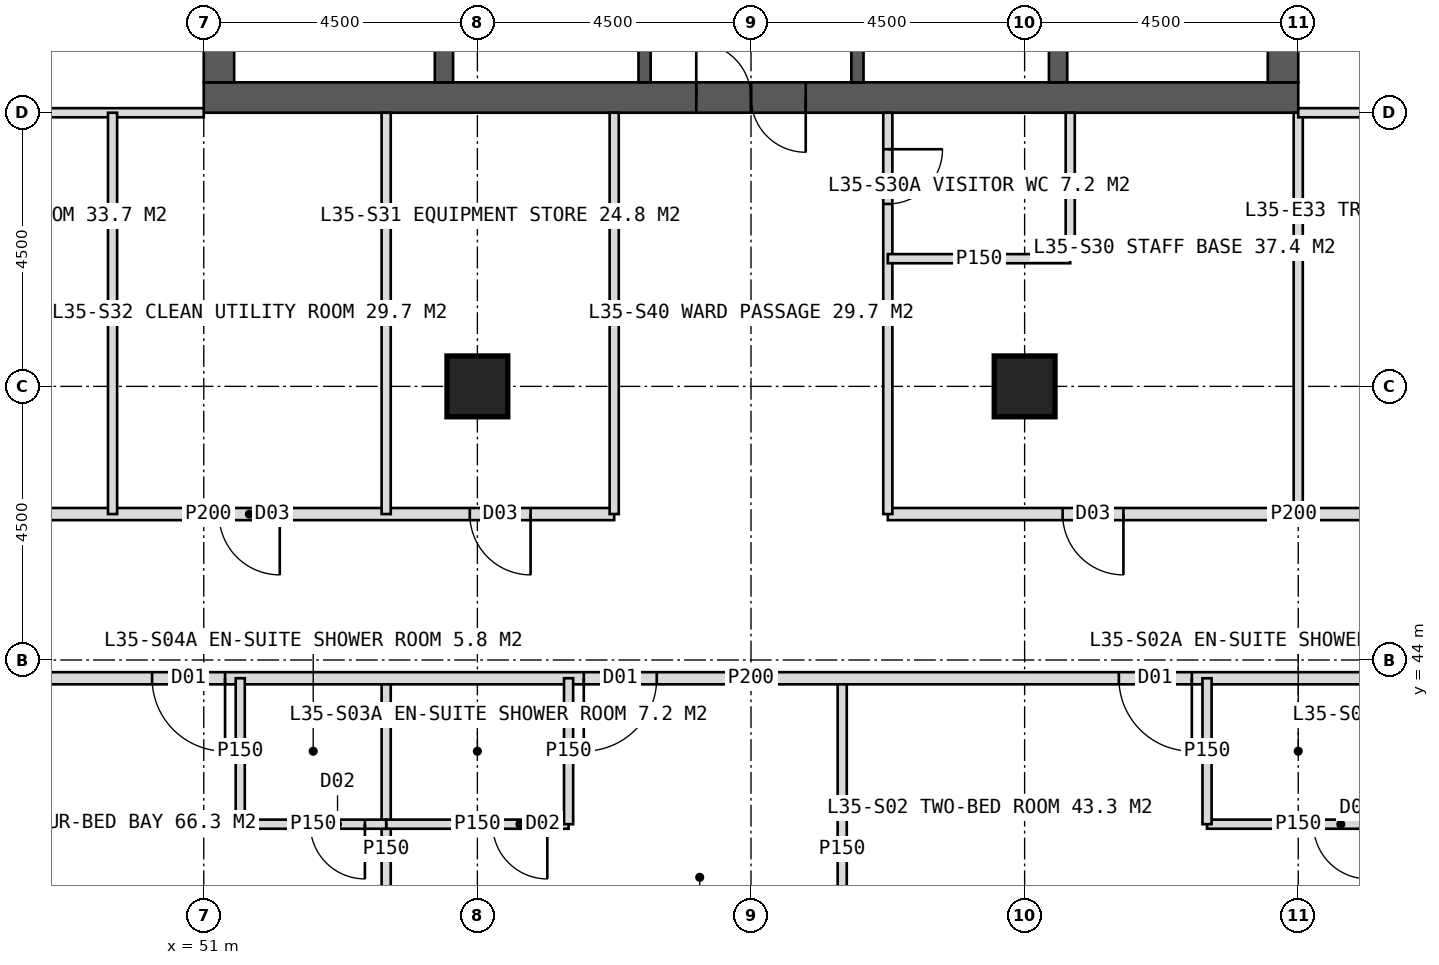
"""IFC4 building model, lengths in metres.
Left out: names, types, materials, properties, quantities, classifications, styles, units other than length and angle.
Written with IfcOpenShell. Run it as: python <this file> out.ifc"""

import sys

from ifc_helpers import new_model, si_unit, direction, frame, frame_2d, origin, origin_2d, place, context, subcontext, project, spatial, rectangle, hollow_rectangle, extrude, element, fill, save


model = new_model("IFC4")
c1 = context("Model", 3, precision=1e-05, world=origin(), true_north=direction((0.0, 1.0)))
c2 = subcontext(c1, "Body", "Model", "MODEL_VIEW")
j1 = project(units=[si_unit("LENGTHUNIT", "METRE"), si_unit("PLANEANGLEUNIT", "RADIAN")], contexts=[c1])
p1 = place(None, origin())
s1 = spatial("IfcSite", under=j1, at=p1, CompositionType="ELEMENT")
p2 = place(p1, origin())
s2 = spatial("IfcBuilding", under=s1, at=p2, CompositionType="ELEMENT")
p3 = place(p2, frame((0.0, 0.0, 148.0)))
s3 = spatial("IfcBuildingStorey", under=s2, at=p3, CompositionType="ELEMENT", Elevation=148.0)
p4 = place(p3, frame((51.0, 53.25, 0.0), z_axis=(0.0, 0.0, 1.0), x_axis=(1.0, 0.0, 0.0)))
e1 = element("IfcWall", 1, at=p4, inside=s3, PredefinedType="SHEAR", context=c2, shape_type="SweptSolid", body=[
    extrude(rectangle(XDim=18.0, YDim=0.5, at=frame_2d((9.0, 0.0))), origin(), (0.0, 0.0, 1.0), 4.0),
])
p5 = place(p4, frame((8.1, 0.0, 0.0)))
e2 = element("IfcOpeningElement", 2, at=p5, cuts=e1, PredefinedType="OPENING", context=c2, shape_type="SweptSolid", body=[
    extrude(rectangle(XDim=1.8, YDim=2.2, at=frame_2d((0.9, 1.1))), frame((0.0, 0.26, 0.0), z_axis=(0.0, -1.0, 0.0), x_axis=(1.0, 0.0, 0.0)), (0.0, 0.0, 1.0), 0.52),
])
p6 = place(p3, frame((51.25, 53.5, 0.0), z_axis=(0.0, 0.0, 1.0), x_axis=(0.0, 1.0, 0.0)))
e3 = element("IfcWall", 3, at=p6, inside=s3, PredefinedType="SHEAR", context=c2, shape_type="SweptSolid", body=[
    extrude(rectangle(XDim=17.0, YDim=0.5, at=frame_2d((8.5, 0.0))), origin(), (0.0, 0.0, 1.0), 4.0),
])
p7 = place(p6, frame((6.0, 0.0, 0.0)))
e4 = element("IfcOpeningElement", 4, at=p7, cuts=e3, PredefinedType="OPENING", context=c2, shape_type="SweptSolid", body=[
    extrude(rectangle(XDim=1.5, YDim=2.2, at=frame_2d((0.75, 1.1))), frame((0.0, 0.26, 0.0), z_axis=(0.0, -1.0, 0.0), x_axis=(1.0, 0.0, 0.0)), (0.0, 0.0, 1.0), 0.52),
])
p8 = place(p3, frame((68.75, 53.5, 0.0), z_axis=(0.0, 0.0, 1.0), x_axis=(0.0, 1.0, 0.0)))
e5 = element("IfcWall", 5, at=p8, inside=s3, PredefinedType="SHEAR", context=c2, shape_type="SweptSolid", body=[
    extrude(rectangle(XDim=17.0, YDim=0.5, at=frame_2d((8.5, 0.0))), origin(), (0.0, 0.0, 1.0), 4.0),
])
p9 = place(p8, frame((9.5, 0.0, 0.0)))
e6 = element("IfcOpeningElement", 6, at=p9, cuts=e5, PredefinedType="OPENING", context=c2, shape_type="SweptSolid", body=[
    extrude(rectangle(XDim=1.5, YDim=2.2, at=frame_2d((0.75, 1.1))), frame((0.0, 0.26, 0.0), z_axis=(0.0, -1.0, 0.0), x_axis=(1.0, 0.0, 0.0)), (0.0, 0.0, 1.0), 0.52),
])
for number, where, z_axis, x_axis in (
    (7, (54.95, 53.5, 0.0), (0.0, 0.0, 1.0), (0.0, 1.0, 0.0)),
    (8, (65.05, 53.5, 0.0), (0.0, 0.0, 1.0), (0.0, 1.0, 0.0)),
):
    element("IfcWall", number, at=place(p3, frame(where, z_axis=z_axis, x_axis=x_axis)), inside=s3, PredefinedType="SHEAR", context=c2, shape_type="SweptSolid", body=[
        extrude(rectangle(XDim=17.0, YDim=0.3, at=frame_2d((8.5, 0.0))), origin(), (0.0, 0.0, 1.0), 4.0),
    ])
p10 = place(p3, frame((58.25, 53.5, 0.0), z_axis=(0.0, 0.0, 1.0), x_axis=(0.0, 1.0, 0.0)))
e9 = element("IfcWall", 9, at=p10, inside=s3, PredefinedType="SHEAR", context=c2, shape_type="SweptSolid", body=[
    extrude(rectangle(XDim=17.0, YDim=0.2, at=frame_2d((8.5, 0.0))), origin(), (0.0, 0.0, 1.0), 4.0),
])
p11 = place(p10, frame((1.375, 0.0, 0.0)))
e10 = element("IfcOpeningElement", 10, at=p11, cuts=e9, PredefinedType="OPENING", context=c2, shape_type="SweptSolid", body=[
    extrude(rectangle(XDim=1.4, YDim=2.2, at=frame_2d((0.7, 1.1))), frame((0.0, 0.11, 0.0), z_axis=(0.0, -1.0, 0.0), x_axis=(1.0, 0.0, 0.0)), (0.0, 0.0, 1.0), 0.22),
])
p12 = place(p10, frame((5.675, 0.0, 0.0)))
e11 = element("IfcOpeningElement", 11, at=p12, cuts=e9, PredefinedType="OPENING", context=c2, shape_type="SweptSolid", body=[
    extrude(rectangle(XDim=1.4, YDim=2.2, at=frame_2d((0.7, 1.1))), frame((0.0, 0.11, 0.0), z_axis=(0.0, -1.0, 0.0), x_axis=(1.0, 0.0, 0.0)), (0.0, 0.0, 1.0), 0.22),
])
p13 = place(p3, frame((61.75, 53.5, 0.0), z_axis=(0.0, 0.0, 1.0), x_axis=(0.0, 1.0, 0.0)))
e12 = element("IfcWall", 12, at=p13, inside=s3, PredefinedType="SHEAR", context=c2, shape_type="SweptSolid", body=[
    extrude(rectangle(XDim=17.0, YDim=0.2, at=frame_2d((8.5, 0.0))), origin(), (0.0, 0.0, 1.0), 4.0),
])
p14 = place(p13, frame((1.375, 0.0, 0.0)))
e13 = element("IfcOpeningElement", 13, at=p14, cuts=e12, PredefinedType="OPENING", context=c2, shape_type="SweptSolid", body=[
    extrude(rectangle(XDim=1.4, YDim=2.2, at=frame_2d((0.7, 1.1))), frame((0.0, 0.11, 0.0), z_axis=(0.0, -1.0, 0.0), x_axis=(1.0, 0.0, 0.0)), (0.0, 0.0, 1.0), 0.22),
])
p15 = place(p13, frame((5.675, 0.0, 0.0)))
e14 = element("IfcOpeningElement", 14, at=p15, cuts=e12, PredefinedType="OPENING", context=c2, shape_type="SweptSolid", body=[
    extrude(rectangle(XDim=1.4, YDim=2.2, at=frame_2d((0.7, 1.1))), frame((0.0, 0.11, 0.0), z_axis=(0.0, -1.0, 0.0), x_axis=(1.0, 0.0, 0.0)), (0.0, 0.0, 1.0), 0.22),
])
for number, where, z_axis, x_axis in (
    (15, (55.5, 48.5, 0.0), (0.0, 0.0, 1.0), (1.0, 0.0, 0.0)),
    (16, (64.5, 48.5, 0.0), (0.0, 0.0, 1.0), (1.0, 0.0, 0.0)),
):
    element("IfcColumn", number, at=place(p3, frame(where, z_axis=z_axis, x_axis=x_axis)), inside=s3, PredefinedType="COLUMN", context=c2, shape_type="SweptSolid", body=[
        extrude(hollow_rectangle(XDim=1.0, YDim=1.0, WallThickness=0.1, at=origin_2d()), origin(), (0.0, 0.0, 1.0), 4.0),
    ])
p16 = place(p3, frame((51.0, 53.0, 0.0), z_axis=(0.0, 0.0, 1.0), x_axis=(-1.0, 0.0, 0.0)))
e17 = element("IfcWall", 17, at=p16, inside=s3, PredefinedType="PARTITIONING", context=c2, shape_type="SweptSolid", body=[
    extrude(rectangle(XDim=6.6, YDim=0.15, at=frame_2d((3.3, 0.0))), origin(), (0.0, 0.0, 1.0), 3.75),
])
for number, where, z_axis, x_axis in (
    (18, (61.5, 43.7, 0.0), (0.0, 0.0, 1.0), (0.0, -1.0, 0.0)),
    (19, (54.0, 43.7, 0.0), (0.0, 0.0, 1.0), (0.0, -1.0, 0.0)),
):
    element("IfcWall", number, at=place(p3, frame(where, z_axis=z_axis, x_axis=x_axis)), inside=s3, PredefinedType="PARTITIONING", context=c2, shape_type="SweptSolid", body=[
        extrude(rectangle(XDim=5.61, YDim=0.15, at=frame_2d((2.805, 0.0))), origin(), (0.0, 0.0, 1.0), 3.75),
    ])
p17 = place(p3, frame((78.3, 43.7, 0.0), z_axis=(0.0, 0.0, 1.0), x_axis=(-1.0, 0.0, 0.0)))
e20 = element("IfcWall", 20, at=p17, inside=s3, PredefinedType="PARTITIONING", context=c2, shape_type="SweptSolid", body=[
    extrude(rectangle(XDim=36.6, YDim=0.2, at=frame_2d((18.3, 0.0))), origin(), (0.0, 0.0, 1.0), 3.75),
])
p18 = place(p17, frame((3.35, 0.0, 0.0)))
e21 = element("IfcOpeningElement", 21, at=p18, cuts=e20, PredefinedType="OPENING", context=c2, shape_type="SweptSolid", body=[
    extrude(rectangle(XDim=1.2, YDim=2.2, at=frame_2d((0.6, 1.1))), frame((0.0, 0.11, 0.0), z_axis=(0.0, -1.0, 0.0), x_axis=(1.0, 0.0, 0.0)), (0.0, 0.0, 1.0), 0.22),
])
p19 = place(p17, frame((11.05, 0.0, 0.0)))
e22 = element("IfcOpeningElement", 22, at=p19, cuts=e20, PredefinedType="OPENING", context=c2, shape_type="SweptSolid", body=[
    extrude(rectangle(XDim=1.2, YDim=2.2, at=frame_2d((0.6, 1.1))), frame((0.0, 0.11, 0.0), z_axis=(0.0, -1.0, 0.0), x_axis=(1.0, 0.0, 0.0)), (0.0, 0.0, 1.0), 0.22),
])
p20 = place(p17, frame((19.85, 0.0, 0.0)))
e23 = element("IfcOpeningElement", 23, at=p20, cuts=e20, PredefinedType="OPENING", context=c2, shape_type="SweptSolid", body=[
    extrude(rectangle(XDim=1.2, YDim=2.2, at=frame_2d((0.6, 1.1))), frame((0.0, 0.11, 0.0), z_axis=(0.0, -1.0, 0.0), x_axis=(1.0, 0.0, 0.0)), (0.0, 0.0, 1.0), 0.22),
])
p21 = place(p17, frame((26.95, 0.0, 0.0)))
e24 = element("IfcOpeningElement", 24, at=p21, cuts=e20, PredefinedType="OPENING", context=c2, shape_type="SweptSolid", body=[
    extrude(rectangle(XDim=1.2, YDim=2.2, at=frame_2d((0.6, 1.1))), frame((0.0, 0.11, 0.0), z_axis=(0.0, -1.0, 0.0), x_axis=(1.0, 0.0, 0.0)), (0.0, 0.0, 1.0), 0.22),
])
p22 = place(p3, frame((70.5, 41.3, 0.0), z_axis=(0.0, 0.0, 1.0), x_axis=(-1.0, 0.0, 0.0)))
e25 = element("IfcWall", 25, at=p22, inside=s3, PredefinedType="PARTITIONING", context=c2, shape_type="SweptSolid", body=[
    extrude(rectangle(XDim=3.0, YDim=0.15, at=frame_2d((1.5, 0.0))), origin(), (0.0, 0.0, 1.0), 3.75),
])
p23 = place(p22, frame((0.35, 0.0, 0.0)))
e26 = element("IfcOpeningElement", 26, at=p23, cuts=e25, PredefinedType="OPENING", context=c2, shape_type="SweptSolid", body=[
    extrude(rectangle(XDim=0.9, YDim=2.1, at=frame_2d((0.45, 1.05))), frame((0.0, 0.085, 0.0), z_axis=(0.0, -1.0, 0.0), x_axis=(1.0, 0.0, 0.0)), (0.0, 0.0, 1.0), 0.17),
])
p24 = place(p3, frame((67.5, 43.7, 0.0), z_axis=(0.0, 0.0, 1.0), x_axis=(0.0, -1.0, 0.0)))
e27 = element("IfcWall", 27, at=p24, inside=s3, PredefinedType="PARTITIONING", context=c2, shape_type="SweptSolid", body=[
    extrude(rectangle(XDim=2.4, YDim=0.15, at=frame_2d((1.2, 0.0))), origin(), (0.0, 0.0, 1.0), 3.75),
])
p25 = place(p3, frame((57.0, 41.3, 0.0), z_axis=(0.0, 0.0, 1.0), x_axis=(-1.0, 0.0, 0.0)))
e28 = element("IfcWall", 28, at=p25, inside=s3, PredefinedType="PARTITIONING", context=c2, shape_type="SweptSolid", body=[
    extrude(rectangle(XDim=3.0, YDim=0.15, at=frame_2d((1.5, 0.0))), origin(), (0.0, 0.0, 1.0), 3.75),
])
p26 = place(p25, frame((0.35, 0.0, 0.0)))
e29 = element("IfcOpeningElement", 29, at=p26, cuts=e28, PredefinedType="OPENING", context=c2, shape_type="SweptSolid", body=[
    extrude(rectangle(XDim=0.9, YDim=2.1, at=frame_2d((0.45, 1.05))), frame((0.0, 0.085, 0.0), z_axis=(0.0, -1.0, 0.0), x_axis=(1.0, 0.0, 0.0)), (0.0, 0.0, 1.0), 0.17),
])
p27 = place(p3, frame((57.0, 43.7, 0.0), z_axis=(0.0, 0.0, 1.0), x_axis=(0.0, -1.0, 0.0)))
e30 = element("IfcWall", 30, at=p27, inside=s3, PredefinedType="PARTITIONING", context=c2, shape_type="SweptSolid", body=[
    extrude(rectangle(XDim=2.4, YDim=0.15, at=frame_2d((1.2, 0.0))), origin(), (0.0, 0.0, 1.0), 3.75),
])
p28 = place(p3, frame((54.0, 41.3, 0.0), z_axis=(0.0, 0.0, 1.0), x_axis=(-1.0, 0.0, 0.0)))
e31 = element("IfcWall", 31, at=p28, inside=s3, PredefinedType="PARTITIONING", context=c2, shape_type="SweptSolid", body=[
    extrude(rectangle(XDim=2.4, YDim=0.15, at=frame_2d((1.2, 0.0))), origin(), (0.0, 0.0, 1.0), 3.75),
])
p29 = place(p28, frame((0.35, 0.0, 0.0)))
e32 = element("IfcOpeningElement", 32, at=p29, cuts=e31, PredefinedType="OPENING", context=c2, shape_type="SweptSolid", body=[
    extrude(rectangle(XDim=0.9, YDim=2.1, at=frame_2d((0.45, 1.05))), frame((0.0, 0.085, 0.0), z_axis=(0.0, -1.0, 0.0), x_axis=(1.0, 0.0, 0.0)), (0.0, 0.0, 1.0), 0.17),
])
p30 = place(p3, frame((51.6, 43.7, 0.0), z_axis=(0.0, 0.0, 1.0), x_axis=(0.0, -1.0, 0.0)))
e33 = element("IfcWall", 33, at=p30, inside=s3, PredefinedType="PARTITIONING", context=c2, shape_type="SweptSolid", body=[
    extrude(rectangle(XDim=2.4, YDim=0.15, at=frame_2d((1.2, 0.0))), origin(), (0.0, 0.0, 1.0), 3.75),
])
p31 = place(p3, frame((69.0, 53.0, 0.0), z_axis=(0.0, 0.0, 1.0), x_axis=(0.0, -1.0, 0.0)))
e34 = element("IfcWall", 34, at=p31, inside=s3, PredefinedType="PARTITIONING", context=c2, shape_type="SweptSolid", body=[
    extrude(rectangle(XDim=6.6, YDim=0.15, at=frame_2d((3.3, 0.0))), origin(), (0.0, 0.0, 1.0), 3.75),
])
p32 = place(p3, frame((75.6, 46.4, 0.0), z_axis=(0.0, 0.0, 1.0), x_axis=(-1.0, 0.0, 0.0)))
e35 = element("IfcWall", 35, at=p32, inside=s3, PredefinedType="PARTITIONING", context=c2, shape_type="SweptSolid", body=[
    extrude(rectangle(XDim=13.35, YDim=0.2, at=frame_2d((6.675, 0.0))), origin(), (0.0, 0.0, 1.0), 3.75),
])
p33 = place(p32, frame((9.475, 0.0, 0.0)))
e36 = element("IfcOpeningElement", 36, at=p33, cuts=e35, PredefinedType="OPENING", context=c2, shape_type="SweptSolid", body=[
    extrude(rectangle(XDim=1.0, YDim=2.1, at=frame_2d((0.5, 1.05))), frame((0.0, 0.11, 0.0), z_axis=(0.0, -1.0, 0.0), x_axis=(1.0, 0.0, 0.0)), (0.0, 0.0, 1.0), 0.22),
])
p34 = place(p3, frame((57.75, 46.4, 0.0), z_axis=(0.0, 0.0, 1.0), x_axis=(-1.0, 0.0, 0.0)))
e37 = element("IfcWall", 37, at=p34, inside=s3, PredefinedType="PARTITIONING", context=c2, shape_type="SweptSolid", body=[
    extrude(rectangle(XDim=13.35, YDim=0.2, at=frame_2d((6.675, 0.0))), origin(), (0.0, 0.0, 1.0), 3.75),
])
p35 = place(p34, frame((1.375, 0.0, 0.0)))
e38 = element("IfcOpeningElement", 38, at=p35, cuts=e37, PredefinedType="OPENING", context=c2, shape_type="SweptSolid", body=[
    extrude(rectangle(XDim=1.0, YDim=2.1, at=frame_2d((0.5, 1.05))), frame((0.0, 0.11, 0.0), z_axis=(0.0, -1.0, 0.0), x_axis=(1.0, 0.0, 0.0)), (0.0, 0.0, 1.0), 0.22),
])
p36 = place(p34, frame((5.5, 0.0, 0.0)))
e39 = element("IfcOpeningElement", 39, at=p36, cuts=e37, PredefinedType="OPENING", context=c2, shape_type="SweptSolid", body=[
    extrude(rectangle(XDim=1.0, YDim=2.1, at=frame_2d((0.5, 1.05))), frame((0.0, 0.11, 0.0), z_axis=(0.0, -1.0, 0.0), x_axis=(1.0, 0.0, 0.0)), (0.0, 0.0, 1.0), 0.22),
])
p37 = place(p34, frame((10.3, 0.0, 0.0)))
e40 = element("IfcOpeningElement", 40, at=p37, cuts=e37, PredefinedType="OPENING", context=c2, shape_type="SweptSolid", body=[
    extrude(rectangle(XDim=1.0, YDim=2.1, at=frame_2d((0.5, 1.05))), frame((0.0, 0.11, 0.0), z_axis=(0.0, -1.0, 0.0), x_axis=(1.0, 0.0, 0.0)), (0.0, 0.0, 1.0), 0.22),
])
p38 = place(p3, frame((62.25, 53.0, 0.0), z_axis=(0.0, 0.0, 1.0), x_axis=(0.0, -1.0, 0.0)))
e41 = element("IfcWall", 41, at=p38, inside=s3, PredefinedType="PARTITIONING", context=c2, shape_type="SweptSolid", body=[
    extrude(rectangle(XDim=6.6, YDim=0.15, at=frame_2d((3.3, 0.0))), origin(), (0.0, 0.0, 1.0), 3.75),
])
p39 = place(p38, frame((0.6, 0.0, 0.0)))
e42 = element("IfcOpeningElement", 42, at=p39, cuts=e41, PredefinedType="OPENING", context=c2, shape_type="SweptSolid", body=[
    extrude(rectangle(XDim=0.9, YDim=2.1, at=frame_2d((0.45, 1.05))), frame((0.0, 0.085, 0.0), z_axis=(0.0, -1.0, 0.0), x_axis=(1.0, 0.0, 0.0)), (0.0, 0.0, 1.0), 0.17),
])
for number, where, z_axis, x_axis in (
    (43, (57.75, 53.0, 0.0), (0.0, 0.0, 1.0), (0.0, -1.0, 0.0)),
    (44, (54.0, 53.0, 0.0), (0.0, 0.0, 1.0), (0.0, -1.0, 0.0)),
    (45, (49.5, 53.0, 0.0), (0.0, 0.0, 1.0), (0.0, -1.0, 0.0)),
):
    element("IfcWall", number, at=place(p3, frame(where, z_axis=z_axis, x_axis=x_axis)), inside=s3, PredefinedType="PARTITIONING", context=c2, shape_type="SweptSolid", body=[
        extrude(rectangle(XDim=6.6, YDim=0.15, at=frame_2d((3.3, 0.0))), origin(), (0.0, 0.0, 1.0), 3.75),
    ])
p40 = place(p3, frame((65.25, 50.6, 0.0), z_axis=(0.0, 0.0, 1.0), x_axis=(-1.0, 0.0, 0.0)))
e46 = element("IfcWall", 46, at=p40, inside=s3, PredefinedType="PARTITIONING", context=c2, shape_type="SweptSolid", body=[
    extrude(rectangle(XDim=3.0, YDim=0.15, at=frame_2d((1.5, 0.0))), origin(), (0.0, 0.0, 1.0), 3.75),
])
p41 = place(p3, frame((65.25, 53.0, 0.0), z_axis=(0.0, 0.0, 1.0), x_axis=(0.0, -1.0, 0.0)))
e47 = element("IfcWall", 47, at=p41, inside=s3, PredefinedType="PARTITIONING", context=c2, shape_type="SweptSolid", body=[
    extrude(rectangle(XDim=2.4, YDim=0.15, at=frame_2d((1.2, 0.0))), origin(), (0.0, 0.0, 1.0), 3.75),
])
p42 = place(p3, frame((69.0, 53.0, 0.0), z_axis=(0.0, 0.0, 1.0), x_axis=(1.0, 0.0, 0.0)))
e48 = element("IfcWall", 48, at=p42, inside=s3, PredefinedType="PARTITIONING", context=c2, shape_type="SweptSolid", body=[
    extrude(rectangle(XDim=6.6, YDim=0.15, at=frame_2d((3.3, 0.0))), origin(), (0.0, 0.0, 1.0), 3.75),
])
p43 = place(p19, origin())
e49 = element("IfcDoor", 49, at=p43, inside=s3, OperationType="SINGLE_SWING_LEFT", PredefinedType="DOOR", context=c2, shape_type="SweptSolid", body=[
    extrude(rectangle(XDim=1.2, YDim=2.2, at=frame_2d((0.6, 1.1))), frame((0.0, 0.025, 0.0), z_axis=(0.0, -1.0, 0.0), x_axis=(1.0, 0.0, 0.0)), (0.0, 0.0, 1.0), 0.05),
])
fill(e22, e49)
p44 = place(p23, origin())
e50 = element("IfcDoor", 50, at=p44, inside=s3, OperationType="SINGLE_SWING_LEFT", PredefinedType="DOOR", context=c2, shape_type="SweptSolid", body=[
    extrude(rectangle(XDim=0.9, YDim=2.1, at=frame_2d((0.45, 1.05))), frame((0.0, 0.025, 0.0), z_axis=(0.0, -1.0, 0.0), x_axis=(1.0, 0.0, 0.0)), (0.0, 0.0, 1.0), 0.05),
])
fill(e26, e50)
p45 = place(p20, origin())
e51 = element("IfcDoor", 51, at=p45, inside=s3, OperationType="SINGLE_SWING_RIGHT", PredefinedType="DOOR", context=c2, shape_type="SweptSolid", body=[
    extrude(rectangle(XDim=1.2, YDim=2.2, at=frame_2d((0.6, 1.1))), frame((0.0, 0.025, 0.0), z_axis=(0.0, -1.0, 0.0), x_axis=(1.0, 0.0, 0.0)), (0.0, 0.0, 1.0), 0.05),
])
fill(e23, e51)
p46 = place(p26, origin())
e52 = element("IfcDoor", 52, at=p46, inside=s3, OperationType="SINGLE_SWING_LEFT", PredefinedType="DOOR", context=c2, shape_type="SweptSolid", body=[
    extrude(rectangle(XDim=0.9, YDim=2.1, at=frame_2d((0.45, 1.05))), frame((0.0, 0.025, 0.0), z_axis=(0.0, -1.0, 0.0), x_axis=(1.0, 0.0, 0.0)), (0.0, 0.0, 1.0), 0.05),
])
fill(e29, e52)
p47 = place(p21, origin())
e53 = element("IfcDoor", 53, at=p47, inside=s3, OperationType="SINGLE_SWING_LEFT", PredefinedType="DOOR", context=c2, shape_type="SweptSolid", body=[
    extrude(rectangle(XDim=1.2, YDim=2.2, at=frame_2d((0.6, 1.1))), frame((0.0, 0.025, 0.0), z_axis=(0.0, -1.0, 0.0), x_axis=(1.0, 0.0, 0.0)), (0.0, 0.0, 1.0), 0.05),
])
fill(e24, e53)
p48 = place(p29, origin())
e54 = element("IfcDoor", 54, at=p48, inside=s3, OperationType="SINGLE_SWING_LEFT", PredefinedType="DOOR", context=c2, shape_type="SweptSolid", body=[
    extrude(rectangle(XDim=0.9, YDim=2.1, at=frame_2d((0.45, 1.05))), frame((0.0, 0.025, 0.0), z_axis=(0.0, -1.0, 0.0), x_axis=(1.0, 0.0, 0.0)), (0.0, 0.0, 1.0), 0.05),
])
fill(e32, e54)
p49 = place(p39, origin())
e55 = element("IfcDoor", 55, at=p49, inside=s3, OperationType="SINGLE_SWING_LEFT", PredefinedType="DOOR", context=c2, shape_type="SweptSolid", body=[
    extrude(rectangle(XDim=0.9, YDim=2.1, at=frame_2d((0.45, 1.05))), frame((0.0, 0.025, 0.0), z_axis=(0.0, -1.0, 0.0), x_axis=(1.0, 0.0, 0.0)), (0.0, 0.0, 1.0), 0.05),
])
fill(e42, e55)
p50 = place(p33, origin())
e56 = element("IfcDoor", 56, at=p50, inside=s3, OperationType="SINGLE_SWING_LEFT", PredefinedType="DOOR", context=c2, shape_type="SweptSolid", body=[
    extrude(rectangle(XDim=1.0, YDim=2.1, at=frame_2d((0.5, 1.05))), frame((0.0, 0.025, 0.0), z_axis=(0.0, -1.0, 0.0), x_axis=(1.0, 0.0, 0.0)), (0.0, 0.0, 1.0), 0.05),
])
fill(e36, e56)
p51 = place(p35, origin())
e57 = element("IfcDoor", 57, at=p51, inside=s3, OperationType="SINGLE_SWING_LEFT", PredefinedType="DOOR", context=c2, shape_type="SweptSolid", body=[
    extrude(rectangle(XDim=1.0, YDim=2.1, at=frame_2d((0.5, 1.05))), frame((0.0, 0.025, 0.0), z_axis=(0.0, -1.0, 0.0), x_axis=(1.0, 0.0, 0.0)), (0.0, 0.0, 1.0), 0.05),
])
fill(e38, e57)
p52 = place(p36, origin())
e58 = element("IfcDoor", 58, at=p52, inside=s3, OperationType="SINGLE_SWING_LEFT", PredefinedType="DOOR", context=c2, shape_type="SweptSolid", body=[
    extrude(rectangle(XDim=1.0, YDim=2.1, at=frame_2d((0.5, 1.05))), frame((0.0, 0.025, 0.0), z_axis=(0.0, -1.0, 0.0), x_axis=(1.0, 0.0, 0.0)), (0.0, 0.0, 1.0), 0.05),
])
fill(e39, e58)
p53 = place(p5, origin())
e59 = element("IfcDoor", 59, at=p53, inside=s3, OperationType="DOUBLE_DOOR_SINGLE_SWING", PredefinedType="DOOR", context=c2, shape_type="SweptSolid", body=[
    extrude(rectangle(XDim=1.8, YDim=2.2, at=frame_2d((0.9, 1.1))), frame((0.0, 0.025, 0.0), z_axis=(0.0, -1.0, 0.0), x_axis=(1.0, 0.0, 0.0)), (0.0, 0.0, 1.0), 0.05),
])
fill(e2, e59)
save(model, sys.argv[1])
